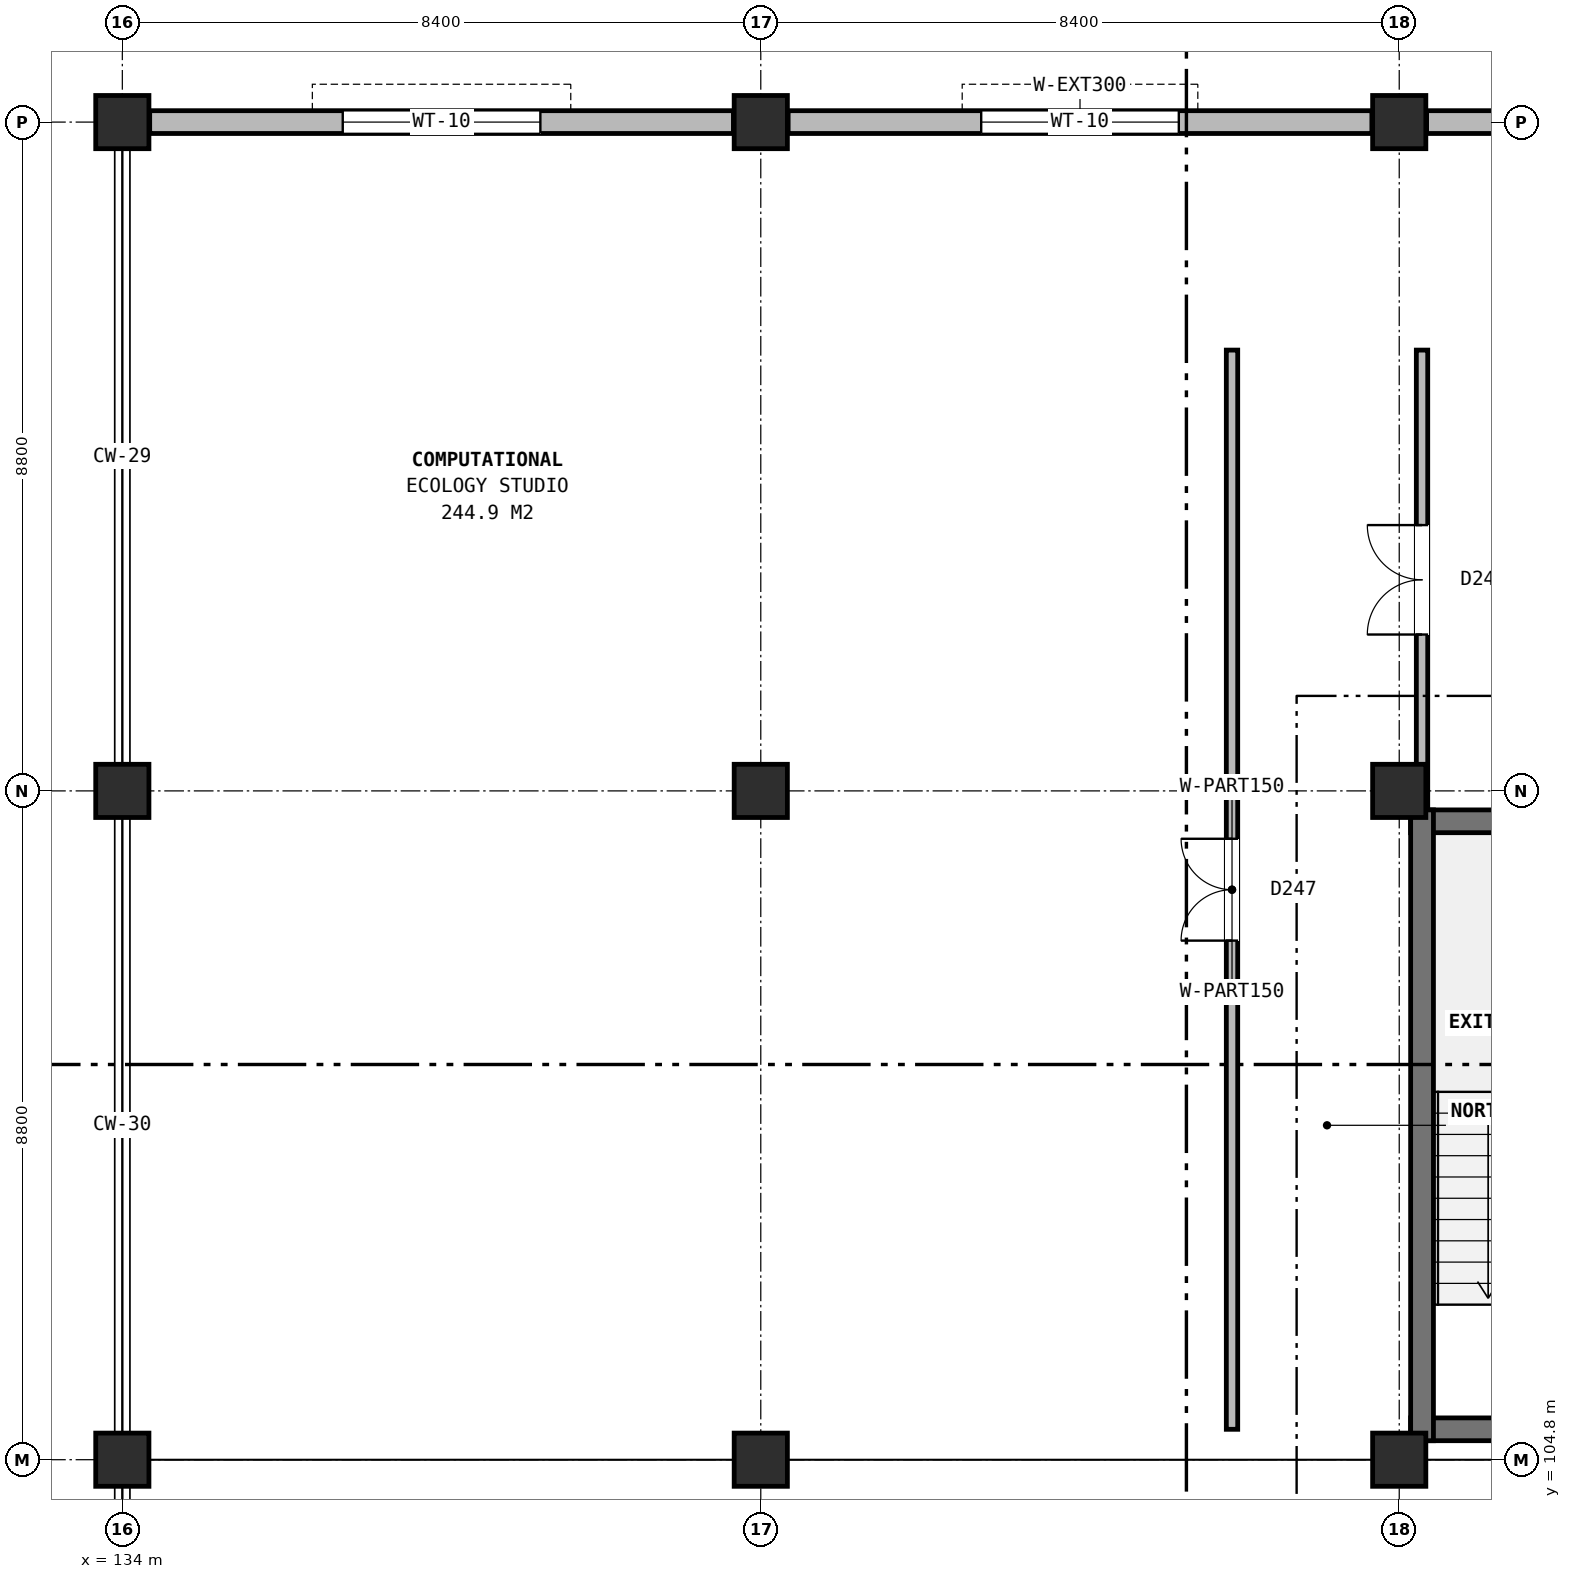
"""IFC4 building model, lengths in metres.
Left out: names, types, materials, properties, quantities, classifications, styles, units other than length and angle.
Written with IfcOpenShell. Run it as: python <this file> out.ifc"""

import sys

from ifc_helpers import new_model, si_unit, direction, frame, frame_2d, origin, origin_2d, place, context, subcontext, project, spatial, rectangle, extrude, element, fill, save


model = new_model("IFC4")
c1 = context("Model", 3, precision=1e-05, world=origin(), true_north=direction((0.0, 1.0)))
c2 = subcontext(c1, "Body", "Model", "MODEL_VIEW")
j1 = project(units=[si_unit("LENGTHUNIT", "METRE"), si_unit("PLANEANGLEUNIT", "RADIAN")], contexts=[c1])
p1 = place(None, origin())
s1 = spatial("IfcSite", under=j1, at=p1, CompositionType="ELEMENT")
p2 = place(p1, origin())
s2 = spatial("IfcBuilding", under=s1, at=p2, CompositionType="ELEMENT")
p3 = place(p2, frame((0.0, 0.0, 40.6)))
s3 = spatial("IfcBuildingStorey", under=s2, at=p3, CompositionType="ELEMENT", Elevation=40.6)
for number, where, z_axis, x_axis in (
    (1, (134.0, 104.8, 0.0), (0.0, 0.0, 1.0), (1.0, 0.0, 0.0)),
    (2, (134.0, 113.6, 0.0), (0.0, 0.0, 1.0), (1.0, 0.0, 0.0)),
    (3, (134.0, 122.4, 0.0), (0.0, 0.0, 1.0), (1.0, 0.0, 0.0)),
    (4, (142.4, 104.8, 0.0), (0.0, 0.0, 1.0), (1.0, 0.0, 0.0)),
    (5, (142.4, 113.6, 0.0), (0.0, 0.0, 1.0), (1.0, 0.0, 0.0)),
    (6, (142.4, 122.4, 0.0), (0.0, 0.0, 1.0), (1.0, 0.0, 0.0)),
    (7, (150.8, 104.8, 0.0), (0.0, 0.0, 1.0), (1.0, 0.0, 0.0)),
    (8, (150.8, 113.6, 0.0), (0.0, 0.0, 1.0), (1.0, 0.0, 0.0)),
    (9, (150.8, 122.4, 0.0), (0.0, 0.0, 1.0), (1.0, 0.0, 0.0)),
):
    element("IfcColumn", number, at=place(p3, frame(where, z_axis=z_axis, x_axis=x_axis)), inside=s3, PredefinedType="COLUMN", context=c2, shape_type="SweptSolid", body=[
        extrude(rectangle(XDim=0.7, YDim=0.7, at=origin_2d()), origin(), (0.0, 0.0, 1.0), 3.8),
    ])
p4 = place(p3, frame((158.84, 122.4, 0.0), z_axis=(0.0, 0.0, 1.0), x_axis=(-1.0, 0.0, 0.0)))
e10 = element("IfcWall", 10, at=p4, inside=s3, PredefinedType="SOLIDWALL", context=c2, shape_type="SweptSolid", body=[
    extrude(rectangle(XDim=7.68, YDim=0.3, at=frame_2d((3.84, 0.0))), origin(), (0.0, 0.0, 1.0), 3.05),
])
p5 = place(p4, frame((2.82, 0.0, 0.9)))
e11 = element("IfcOpeningElement", 11, at=p5, cuts=e10, PredefinedType="OPENING", context=c2, shape_type="SweptSolid", body=[
    extrude(rectangle(XDim=2.04, YDim=1.98, at=frame_2d((1.02, 0.99))), frame((0.0, 0.16, 0.0), z_axis=(0.0, -1.0, 0.0), x_axis=(1.0, 0.0, 0.0)), (0.0, 0.0, 1.0), 0.32),
])
p6 = place(p3, frame((150.44, 122.4, 0.0), z_axis=(0.0, 0.0, 1.0), x_axis=(-1.0, 0.0, 0.0)))
e12 = element("IfcWall", 12, at=p6, inside=s3, PredefinedType="SOLIDWALL", context=c2, shape_type="SweptSolid", body=[
    extrude(rectangle(XDim=7.68, YDim=0.3, at=frame_2d((3.84, 0.0))), origin(), (0.0, 0.0, 1.0), 3.05),
])
p7 = place(p6, frame((2.54, 0.0, 0.9)))
e13 = element("IfcOpeningElement", 13, at=p7, cuts=e12, PredefinedType="OPENING", context=c2, shape_type="SweptSolid", body=[
    extrude(rectangle(XDim=2.6, YDim=2.0, at=frame_2d((1.3, 1.0))), frame((0.0, 0.16, 0.0), z_axis=(0.0, -1.0, 0.0), x_axis=(1.0, 0.0, 0.0)), (0.0, 0.0, 1.0), 0.32),
])
p8 = place(p3, frame((142.04, 122.4, 0.0), z_axis=(0.0, 0.0, 1.0), x_axis=(-1.0, 0.0, 0.0)))
e14 = element("IfcWall", 14, at=p8, inside=s3, PredefinedType="SOLIDWALL", context=c2, shape_type="SweptSolid", body=[
    extrude(rectangle(XDim=7.68, YDim=0.3, at=frame_2d((3.84, 0.0))), origin(), (0.0, 0.0, 1.0), 3.05),
])
p9 = place(p8, frame((2.54, 0.0, 0.9)))
e15 = element("IfcOpeningElement", 15, at=p9, cuts=e14, PredefinedType="OPENING", context=c2, shape_type="SweptSolid", body=[
    extrude(rectangle(XDim=2.6, YDim=2.0, at=frame_2d((1.3, 1.0))), frame((0.0, 0.16, 0.0), z_axis=(0.0, -1.0, 0.0), x_axis=(1.0, 0.0, 0.0)), (0.0, 0.0, 1.0), 0.32),
])
for number, where, z_axis, x_axis in (
    (16, (150.95, 105.2, 0.0), (0.0, 0.0, 1.0), (1.0, 0.0, 0.0)),
    (17, (150.95, 113.2, 0.0), (0.0, 0.0, 1.0), (1.0, 0.0, 0.0)),
):
    element("IfcWall", number, at=place(p3, frame(where, z_axis=z_axis, x_axis=x_axis)), inside=s3, PredefinedType="SHEAR", context=c2, shape_type="SweptSolid", body=[
        extrude(rectangle(XDim=3.6, YDim=0.3, at=frame_2d((1.8, 0.0))), origin(), (0.0, 0.0, 1.0), 3.8),
    ])
p10 = place(p3, frame((151.1, 105.05, 0.0), z_axis=(0.0, 0.0, 1.0), x_axis=(0.0, 1.0, 0.0)))
e18 = element("IfcWall", 18, at=p10, inside=s3, PredefinedType="SHEAR", context=c2, shape_type="SweptSolid", body=[
    extrude(rectangle(XDim=8.3, YDim=0.3, at=frame_2d((4.15, 0.0))), origin(), (0.0, 0.0, 1.0), 3.8),
])
p11 = place(p3, frame((148.6, 105.2, 0.0), z_axis=(0.0, 0.0, 1.0), x_axis=(0.0, 1.0, 0.0)))
e19 = element("IfcWall", 19, at=p11, inside=s3, PredefinedType="PARTITIONING", context=c2, shape_type="SweptSolid", body=[
    extrude(rectangle(XDim=14.2, YDim=0.15, at=frame_2d((7.1, 0.0))), origin(), (0.0, 0.0, 1.0), 3.465),
])
p12 = place(p11, frame((6.43, 0.0, 0.0)))
e20 = element("IfcOpeningElement", 20, at=p12, cuts=e19, PredefinedType="OPENING", context=c2, shape_type="SweptSolid", body=[
    extrude(rectangle(XDim=1.34, YDim=2.24, at=frame_2d((0.67, 1.12))), frame((0.0, 0.085, 0.0), z_axis=(0.0, -1.0, 0.0), x_axis=(1.0, 0.0, 0.0)), (0.0, 0.0, 1.0), 0.17),
])
p13 = place(p3, frame((151.1, 113.355, 0.0), z_axis=(0.0, 0.0, 1.0), x_axis=(0.0, 1.0, 0.0)))
e21 = element("IfcWall", 21, at=p13, inside=s3, PredefinedType="PARTITIONING", context=c2, shape_type="SweptSolid", body=[
    extrude(rectangle(XDim=6.045, YDim=0.15, at=frame_2d((3.022, 0.0))), origin(), (0.0, 0.0, 1.0), 3.045),
])
p14 = place(p13, frame((2.302, 0.0, 0.0)))
e22 = element("IfcOpeningElement", 22, at=p14, cuts=e21, PredefinedType="OPENING", context=c2, shape_type="SweptSolid", body=[
    extrude(rectangle(XDim=1.44, YDim=2.26, at=frame_2d((0.72, 1.13))), frame((0.0, 0.085, 0.0), z_axis=(0.0, -1.0, 0.0), x_axis=(1.0, 0.0, 0.0)), (0.0, 0.0, 1.0), 0.17),
])
p15 = place(p7, origin())
e23 = element("IfcWindow", 23, at=p15, inside=s3, PartitioningType="SINGLE_PANEL", PredefinedType="WINDOW", context=c2, shape_type="SweptSolid", body=[
    extrude(rectangle(XDim=2.6, YDim=2.0, at=frame_2d((1.3, 1.0))), frame((0.0, 0.03, 0.0), z_axis=(0.0, -1.0, 0.0), x_axis=(1.0, 0.0, 0.0)), (0.0, 0.0, 1.0), 0.06),
])
fill(e13, e23)
p16 = place(p9, origin())
e24 = element("IfcWindow", 24, at=p16, inside=s3, PartitioningType="SINGLE_PANEL", PredefinedType="WINDOW", context=c2, shape_type="SweptSolid", body=[
    extrude(rectangle(XDim=2.6, YDim=2.0, at=frame_2d((1.3, 1.0))), frame((0.0, 0.03, 0.0), z_axis=(0.0, -1.0, 0.0), x_axis=(1.0, 0.0, 0.0)), (0.0, 0.0, 1.0), 0.06),
])
fill(e15, e24)
p17 = place(p12, origin())
e25 = element("IfcDoor", 25, at=p17, inside=s3, OperationType="DOUBLE_DOOR_SINGLE_SWING", PredefinedType="DOOR", context=c2, shape_type="SweptSolid", body=[
    extrude(rectangle(XDim=1.34, YDim=2.24, at=frame_2d((0.67, 1.12))), frame((0.0, 0.025, 0.0), z_axis=(0.0, -1.0, 0.0), x_axis=(1.0, 0.0, 0.0)), (0.0, 0.0, 1.0), 0.05),
])
fill(e20, e25)
p18 = place(p14, origin())
e26 = element("IfcDoor", 26, at=p18, inside=s3, OperationType="DOUBLE_DOOR_SINGLE_SWING", PredefinedType="DOOR", context=c2, shape_type="SweptSolid", body=[
    extrude(rectangle(XDim=1.44, YDim=2.26, at=frame_2d((0.72, 1.13))), frame((0.0, 0.025, 0.0), z_axis=(0.0, -1.0, 0.0), x_axis=(1.0, 0.0, 0.0)), (0.0, 0.0, 1.0), 0.05),
])
fill(e22, e26)
save(model, sys.argv[1])
